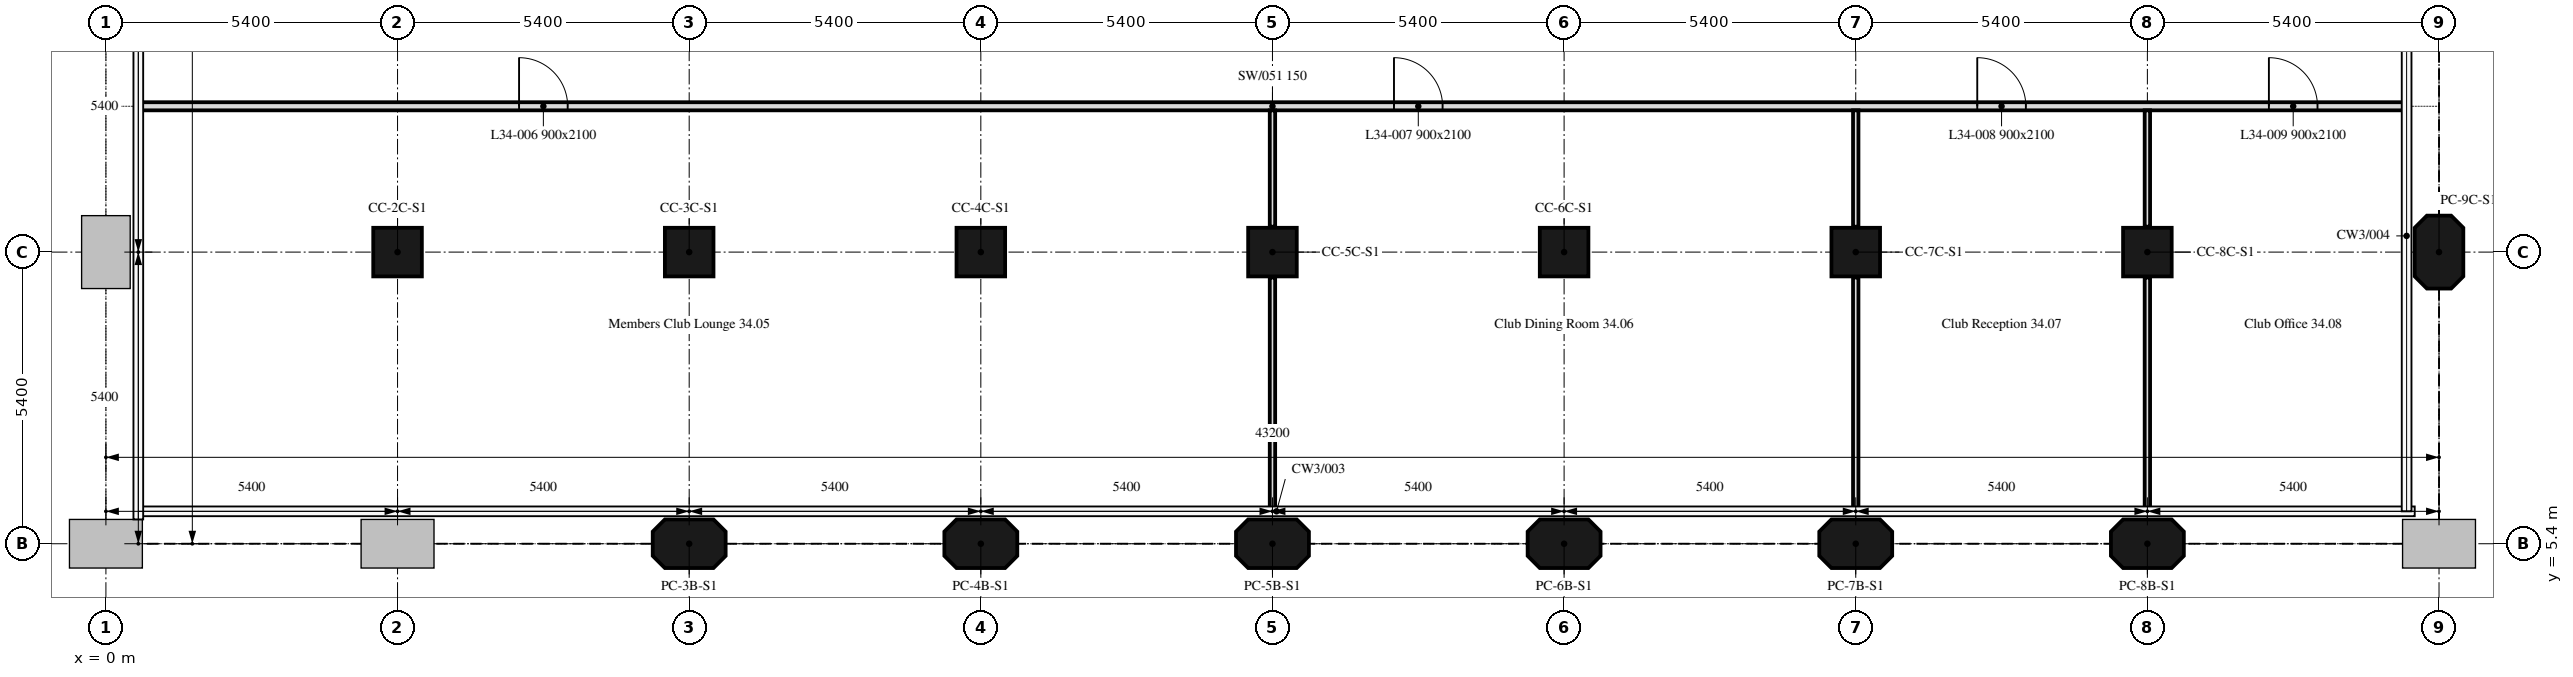
"""IFC4 building model, lengths in metres.
Left out: names, types, materials, properties, quantities, classifications, styles, units other than length and angle.
Written with IfcOpenShell. Run it as: python <this file> out.ifc"""

import sys

from ifc_helpers import new_model, si_unit, direction, frame, frame_2d, origin, origin_2d, place, context, subcontext, project, spatial, polyline, rectangle, outline, extrude, element, fill, save


model = new_model("IFC4")
c1 = context("Model", 3, precision=1e-05, world=origin(), true_north=direction((0.0, 1.0)))
c2 = subcontext(c1, "Body", "Model", "MODEL_VIEW")
j1 = project(units=[si_unit("LENGTHUNIT", "METRE"), si_unit("PLANEANGLEUNIT", "RADIAN")], contexts=[c1])
p1 = place(None, origin())
s1 = spatial("IfcSite", under=j1, at=p1, CompositionType="ELEMENT")
p2 = place(p1, origin())
s2 = spatial("IfcBuilding", under=s1, at=p2, CompositionType="ELEMENT")
p3 = place(p2, frame((0.0, 0.0, 148.0)))
s3 = spatial("IfcBuildingStorey", under=s2, at=p3, CompositionType="ELEMENT", Elevation=148.0)
for number, where, z_axis, x_axis in (
    (1, (10.8, 5.4, 0.0), (0.0, 0.0, 1.0), (1.0, 0.0, 0.0)),
    (2, (16.2, 5.4, 0.0), (0.0, 0.0, 1.0), (1.0, 0.0, 0.0)),
    (3, (21.6, 5.4, 0.0), (0.0, 0.0, 1.0), (1.0, 0.0, 0.0)),
    (4, (27.0, 5.4, 0.0), (0.0, 0.0, 1.0), (1.0, 0.0, 0.0)),
    (5, (32.4, 5.4, 0.0), (0.0, 0.0, 1.0), (1.0, 0.0, 0.0)),
    (6, (37.8, 5.4, 0.0), (0.0, 0.0, 1.0), (1.0, 0.0, 0.0)),
):
    element("IfcColumn", number, at=place(p3, frame(where, z_axis=z_axis, x_axis=x_axis)), inside=s3, PredefinedType="COLUMN", context=c2, shape_type="SweptSolid", body=[
        extrude(outline(polyline([(-0.45, -0.45), (0.45, -0.45), (0.675, -0.225), (0.675, 0.225), (0.45, 0.45), (-0.45, 0.45), (-0.675, 0.225), (-0.675, -0.225), (-0.45, -0.45)])), origin(), (0.0, 0.0, 1.0), 4.5),
    ])
for number, where, z_axis, x_axis in (
    (7, (5.4, 10.8, 0.0), (0.0, 0.0, 1.0), (1.0, 0.0, 0.0)),
    (8, (10.8, 10.8, 0.0), (0.0, 0.0, 1.0), (1.0, 0.0, 0.0)),
    (9, (16.2, 10.8, 0.0), (0.0, 0.0, 1.0), (1.0, 0.0, 0.0)),
    (10, (21.6, 10.8, 0.0), (0.0, 0.0, 1.0), (1.0, 0.0, 0.0)),
    (11, (27.0, 10.8, 0.0), (0.0, 0.0, 1.0), (1.0, 0.0, 0.0)),
    (12, (32.4, 10.8, 0.0), (0.0, 0.0, 1.0), (1.0, 0.0, 0.0)),
    (13, (37.8, 10.8, 0.0), (0.0, 0.0, 1.0), (1.0, 0.0, 0.0)),
):
    element("IfcColumn", number, at=place(p3, frame(where, z_axis=z_axis, x_axis=x_axis)), inside=s3, PredefinedType="COLUMN", context=c2, shape_type="SweptSolid", body=[
        extrude(rectangle(XDim=0.9, YDim=0.9, at=origin_2d()), origin(), (0.0, 0.0, 1.0), 4.5),
    ])
p4 = place(p3, frame((43.2, 10.8, 0.0), z_axis=(0.0, 0.0, 1.0), x_axis=(0.0, 1.0, 0.0)))
e14 = element("IfcColumn", 14, at=p4, inside=s3, PredefinedType="COLUMN", context=c2, shape_type="SweptSolid", body=[
    extrude(outline(polyline([(-0.45, -0.45), (0.45, -0.45), (0.675, -0.225), (0.675, 0.225), (0.45, 0.45), (-0.45, 0.45), (-0.675, 0.225), (-0.675, -0.225), (-0.45, -0.45)])), origin(), (0.0, 0.0, 1.0), 4.5),
])
p5 = place(p3, frame((0.6, 13.5, 0.0), z_axis=(0.0, 0.0, 1.0), x_axis=(1.0, 0.0, 0.0)))
e15 = element("IfcWall", 15, at=p5, inside=s3, PredefinedType="PARTITIONING", context=c2, shape_type="SweptSolid", body=[
    extrude(rectangle(XDim=42.0, YDim=0.15, at=frame_2d((21.0, 0.0))), origin(), (0.0, 0.0, 1.0), 3.75),
])
p6 = place(p5, frame((7.05, 0.0, 0.0)))
e16 = element("IfcOpeningElement", 16, at=p6, cuts=e15, PredefinedType="OPENING", context=c2, shape_type="SweptSolid", body=[
    extrude(rectangle(XDim=0.9, YDim=2.1, at=frame_2d((0.45, 1.05))), frame((0.0, 0.075, 0.0), z_axis=(0.0, -1.0, 0.0), x_axis=(1.0, 0.0, 0.0)), (0.0, 0.0, 1.0), 0.15),
])
p7 = place(p5, frame((23.25, 0.0, 0.0)))
e17 = element("IfcOpeningElement", 17, at=p7, cuts=e15, PredefinedType="OPENING", context=c2, shape_type="SweptSolid", body=[
    extrude(rectangle(XDim=0.9, YDim=2.1, at=frame_2d((0.45, 1.05))), frame((0.0, 0.075, 0.0), z_axis=(0.0, -1.0, 0.0), x_axis=(1.0, 0.0, 0.0)), (0.0, 0.0, 1.0), 0.15),
])
p8 = place(p5, frame((34.05, 0.0, 0.0)))
e18 = element("IfcOpeningElement", 18, at=p8, cuts=e15, PredefinedType="OPENING", context=c2, shape_type="SweptSolid", body=[
    extrude(rectangle(XDim=0.9, YDim=2.1, at=frame_2d((0.45, 1.05))), frame((0.0, 0.075, 0.0), z_axis=(0.0, -1.0, 0.0), x_axis=(1.0, 0.0, 0.0)), (0.0, 0.0, 1.0), 0.15),
])
p9 = place(p5, frame((39.45, 0.0, 0.0)))
e19 = element("IfcOpeningElement", 19, at=p9, cuts=e15, PredefinedType="OPENING", context=c2, shape_type="SweptSolid", body=[
    extrude(rectangle(XDim=0.9, YDim=2.1, at=frame_2d((0.45, 1.05))), frame((0.0, 0.075, 0.0), z_axis=(0.0, -1.0, 0.0), x_axis=(1.0, 0.0, 0.0)), (0.0, 0.0, 1.0), 0.15),
])
p10 = place(p3, frame((21.6, 6.0, 0.0), z_axis=(0.0, 0.0, 1.0), x_axis=(0.0, 1.0, 0.0)))
e20 = element("IfcWall", 20, at=p10, inside=s3, PredefinedType="PARTITIONING", context=c2, shape_type="SweptSolid", body=[
    extrude(rectangle(XDim=4.33, YDim=0.1, at=frame_2d((2.165, 0.0))), origin(), (0.0, 0.0, 1.0), 3.75),
])
p11 = place(p3, frame((21.6, 11.27, 0.0), z_axis=(0.0, 0.0, 1.0), x_axis=(0.0, 1.0, 0.0)))
e21 = element("IfcWall", 21, at=p11, inside=s3, PredefinedType="PARTITIONING", context=c2, shape_type="SweptSolid", body=[
    extrude(rectangle(XDim=2.155, YDim=0.1, at=frame_2d((1.078, 0.0))), origin(), (0.0, 0.0, 1.0), 3.75),
])
p12 = place(p3, frame((32.4, 6.0, 0.0), z_axis=(0.0, 0.0, 1.0), x_axis=(0.0, 1.0, 0.0)))
e22 = element("IfcWall", 22, at=p12, inside=s3, PredefinedType="PARTITIONING", context=c2, shape_type="SweptSolid", body=[
    extrude(rectangle(XDim=4.33, YDim=0.1, at=frame_2d((2.165, 0.0))), origin(), (0.0, 0.0, 1.0), 3.75),
])
p13 = place(p3, frame((32.4, 11.27, 0.0), z_axis=(0.0, 0.0, 1.0), x_axis=(0.0, 1.0, 0.0)))
e23 = element("IfcWall", 23, at=p13, inside=s3, PredefinedType="PARTITIONING", context=c2, shape_type="SweptSolid", body=[
    extrude(rectangle(XDim=2.155, YDim=0.1, at=frame_2d((1.078, 0.0))), origin(), (0.0, 0.0, 1.0), 3.75),
])
p14 = place(p3, frame((37.8, 6.0, 0.0), z_axis=(0.0, 0.0, 1.0), x_axis=(0.0, 1.0, 0.0)))
e24 = element("IfcWall", 24, at=p14, inside=s3, PredefinedType="PARTITIONING", context=c2, shape_type="SweptSolid", body=[
    extrude(rectangle(XDim=4.33, YDim=0.1, at=frame_2d((2.165, 0.0))), origin(), (0.0, 0.0, 1.0), 3.75),
])
p15 = place(p3, frame((37.8, 11.27, 0.0), z_axis=(0.0, 0.0, 1.0), x_axis=(0.0, 1.0, 0.0)))
e25 = element("IfcWall", 25, at=p15, inside=s3, PredefinedType="PARTITIONING", context=c2, shape_type="SweptSolid", body=[
    extrude(rectangle(XDim=2.155, YDim=0.1, at=frame_2d((1.078, 0.0))), origin(), (0.0, 0.0, 1.0), 3.75),
])
p16 = place(p6, origin())
e26 = element("IfcDoor", 26, at=p16, inside=s3, OperationType="SINGLE_SWING_RIGHT", PredefinedType="DOOR", context=c2, shape_type="SweptSolid", body=[
    extrude(rectangle(XDim=0.9, YDim=2.1, at=frame_2d((0.45, 1.05))), frame((0.0, 0.025, 0.0), z_axis=(0.0, -1.0, 0.0), x_axis=(1.0, 0.0, 0.0)), (0.0, 0.0, 1.0), 0.05),
])
fill(e16, e26)
p17 = place(p7, origin())
e27 = element("IfcDoor", 27, at=p17, inside=s3, OperationType="SINGLE_SWING_RIGHT", PredefinedType="DOOR", context=c2, shape_type="SweptSolid", body=[
    extrude(rectangle(XDim=0.9, YDim=2.1, at=frame_2d((0.45, 1.05))), frame((0.0, 0.025, 0.0), z_axis=(0.0, -1.0, 0.0), x_axis=(1.0, 0.0, 0.0)), (0.0, 0.0, 1.0), 0.05),
])
fill(e17, e27)
p18 = place(p8, origin())
e28 = element("IfcDoor", 28, at=p18, inside=s3, OperationType="SINGLE_SWING_RIGHT", PredefinedType="DOOR", context=c2, shape_type="SweptSolid", body=[
    extrude(rectangle(XDim=0.9, YDim=2.1, at=frame_2d((0.45, 1.05))), frame((0.0, 0.025, 0.0), z_axis=(0.0, -1.0, 0.0), x_axis=(1.0, 0.0, 0.0)), (0.0, 0.0, 1.0), 0.05),
])
fill(e18, e28)
p19 = place(p9, origin())
e29 = element("IfcDoor", 29, at=p19, inside=s3, OperationType="SINGLE_SWING_LEFT", PredefinedType="DOOR", context=c2, shape_type="SweptSolid", body=[
    extrude(rectangle(XDim=0.9, YDim=2.1, at=frame_2d((0.45, 1.05))), frame((0.0, 0.025, 0.0), z_axis=(0.0, -1.0, 0.0), x_axis=(1.0, 0.0, 0.0)), (0.0, 0.0, 1.0), 0.05),
])
fill(e19, e29)
save(model, sys.argv[1])
